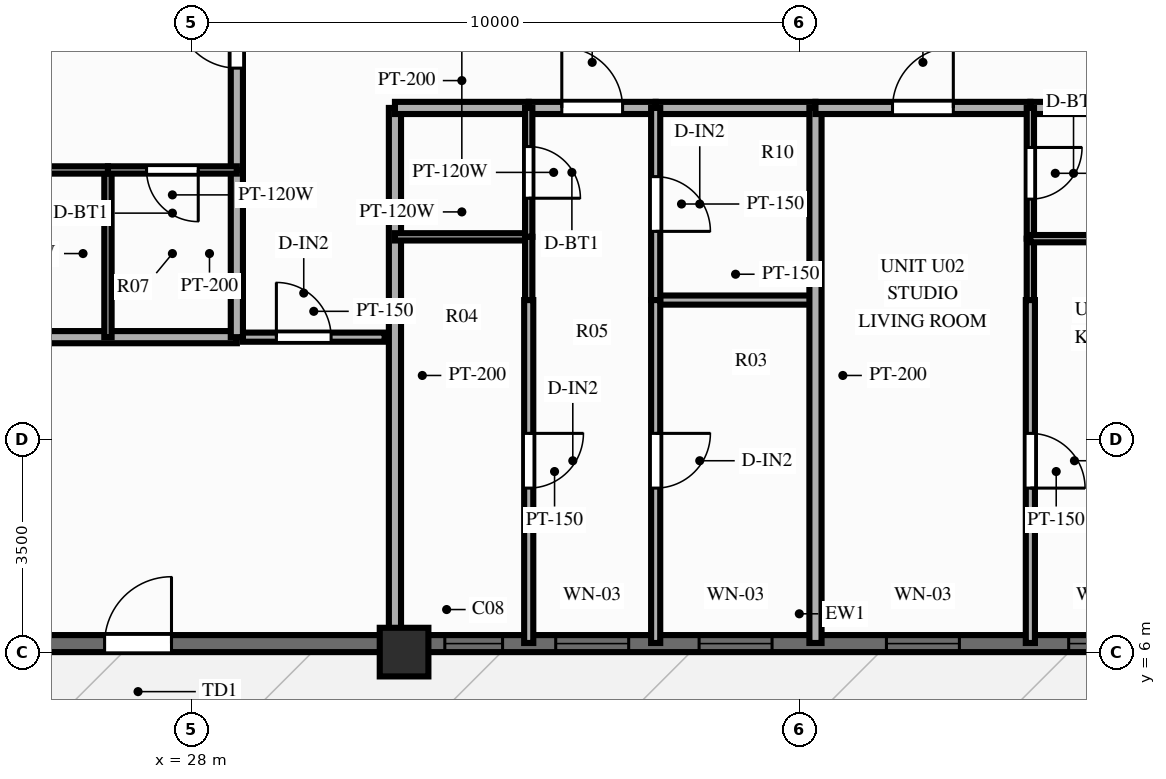
"""IFC4 building model, lengths in metres.
Left out: names, types, materials, properties, quantities, classifications, styles, units other than length and angle.
Written with IfcOpenShell. Run it as: python <this file> out.ifc"""

import sys

from ifc_helpers import new_model, si_unit, direction, frame, frame_2d, origin, origin_2d, place, context, subcontext, project, spatial, rectangle, extrude, source, transform, mapped, element, fill, save


model = new_model("IFC4")
c1 = context("Model", 3, precision=1e-05, world=origin(), true_north=direction((0.0, 1.0)))
c2 = subcontext(c1, "Body", "Model", "MODEL_VIEW")
j1 = project(units=[si_unit("LENGTHUNIT", "METRE"), si_unit("PLANEANGLEUNIT", "RADIAN")], contexts=[c1])
p1 = place(None, origin())
s1 = spatial("IfcSite", under=j1, at=p1, CompositionType="ELEMENT")
p2 = place(p1, origin())
s2 = spatial("IfcBuilding", under=s1, at=p2, CompositionType="ELEMENT")
p3 = place(p2, frame((0.0, 0.0, 176.8)))
s3 = spatial("IfcBuildingStorey", under=s2, at=p3, CompositionType="ELEMENT", Elevation=176.8)
m1 = source(origin(), c2, "Body", "SweptSolid", [
    extrude(rectangle(XDim=0.8, YDim=0.8, at=origin_2d()), origin(), (0.0, 0.0, 1.0), 3.0),
])
p4 = place(p3, frame((31.5, 6.0, 0.0), z_axis=(0.0, 0.0, 1.0), x_axis=(1.0, 0.0, 0.0)))
e1 = element("IfcColumn", 1, at=p4, inside=s3, PredefinedType="COLUMN", context=c2, shape_type="MappedRepresentation", body=[
    mapped(m1, transform((0.0, 0.0, 0.0), scale=1.0)),
])
p5 = place(p3, frame((22.75, 6.14, 0.0), z_axis=(0.0, 0.0, 1.0), x_axis=(1.0, 0.0, 0.0)))
e2 = element("IfcWall", 2, at=p5, inside=s3, PredefinedType="SOLIDWALL", context=c2, shape_type="SweptSolid", body=[
    extrude(rectangle(XDim=30.5, YDim=0.28, at=frame_2d((15.25, 0.0))), origin(), (0.0, 0.0, 1.0), 2.28),
])
p6 = place(p5, frame((4.925, 0.0, 0.0), z_axis=(0.0, 0.0, 1.0), x_axis=(-1.0, 0.0, 0.0)))
e3 = element("IfcOpeningElement", 3, at=p6, cuts=e2, PredefinedType="OPENING", context=c2, shape_type="SweptSolid", body=[
    extrude(rectangle(XDim=1.1, YDim=2.15, at=frame_2d((0.55, 1.075))), frame((0.0, 0.152, 0.0), z_axis=(0.0, -1.0, 0.0), x_axis=(1.0, 0.0, 0.0)), (0.0, 0.0, 1.0), 0.304),
])
p7 = place(p5, frame((9.42, 0.0, 0.25)))
e4 = element("IfcOpeningElement", 4, at=p7, cuts=e2, PredefinedType="OPENING", context=c2, shape_type="SweptSolid", body=[
    extrude(rectangle(XDim=0.95, YDim=1.5, at=frame_2d((0.475, 0.75))), frame((0.0, 0.152, 0.0), z_axis=(0.0, -1.0, 0.0), x_axis=(1.0, 0.0, 0.0)), (0.0, 0.0, 1.0), 0.304),
])
p8 = place(p5, frame((11.244, 0.0, 0.25)))
e5 = element("IfcOpeningElement", 5, at=p8, cuts=e2, PredefinedType="OPENING", context=c2, shape_type="SweptSolid", body=[
    extrude(rectangle(XDim=1.2, YDim=1.5, at=frame_2d((0.6, 0.75))), frame((0.0, 0.152, 0.0), z_axis=(0.0, -1.0, 0.0), x_axis=(1.0, 0.0, 0.0)), (0.0, 0.0, 1.0), 0.304),
])
p9 = place(p5, frame((13.602, 0.0, 0.25)))
e6 = element("IfcOpeningElement", 6, at=p9, cuts=e2, PredefinedType="OPENING", context=c2, shape_type="SweptSolid", body=[
    extrude(rectangle(XDim=1.2, YDim=1.5, at=frame_2d((0.6, 0.75))), frame((0.0, 0.152, 0.0), z_axis=(0.0, -1.0, 0.0), x_axis=(1.0, 0.0, 0.0)), (0.0, 0.0, 1.0), 0.304),
])
p10 = place(p5, frame((16.683, 0.0, 0.25)))
e7 = element("IfcOpeningElement", 7, at=p10, cuts=e2, PredefinedType="OPENING", context=c2, shape_type="SweptSolid", body=[
    extrude(rectangle(XDim=1.2, YDim=1.5, at=frame_2d((0.6, 0.75))), frame((0.0, 0.152, 0.0), z_axis=(0.0, -1.0, 0.0), x_axis=(1.0, 0.0, 0.0)), (0.0, 0.0, 1.0), 0.304),
])
p11 = place(p5, frame((19.68, 0.0, 0.25)))
e8 = element("IfcOpeningElement", 8, at=p11, cuts=e2, PredefinedType="OPENING", context=c2, shape_type="SweptSolid", body=[
    extrude(rectangle(XDim=1.2, YDim=1.5, at=frame_2d((0.6, 0.75))), frame((0.0, 0.152, 0.0), z_axis=(0.0, -1.0, 0.0), x_axis=(1.0, 0.0, 0.0)), (0.0, 0.0, 1.0), 0.304),
])
p12 = place(p5, frame((25.525, 0.0, 0.25)))
e9 = element("IfcOpeningElement", 9, at=p12, cuts=e2, PredefinedType="OPENING", context=c2, shape_type="SweptSolid", body=[
    extrude(rectangle(XDim=1.2, YDim=1.5, at=frame_2d((0.6, 0.75))), frame((0.0, 0.152, 0.0), z_axis=(0.0, -1.0, 0.0), x_axis=(1.0, 0.0, 0.0)), (0.0, 0.0, 1.0), 0.304),
])
p13 = place(p3, frame((28.85, 11.18, 0.0), z_axis=(0.0, 0.0, 1.0), x_axis=(1.0, 0.0, 0.0)))
e10 = element("IfcWall", 10, at=p13, inside=s3, PredefinedType="PARTITIONING", context=c2, shape_type="SweptSolid", body=[
    extrude(rectangle(XDim=2.33, YDim=0.15, at=frame_2d((1.165, 0.0))), origin(), (0.0, 0.0, 1.0), 2.79),
])
p14 = place(p13, frame((0.55, 0.0, 0.0)))
e11 = element("IfcOpeningElement", 11, at=p14, cuts=e10, PredefinedType="OPENING", context=c2, shape_type="SweptSolid", body=[
    extrude(rectangle(XDim=0.9, YDim=2.1, at=frame_2d((0.45, 1.05))), frame((0.0, 0.087, 0.0), z_axis=(0.0, -1.0, 0.0), x_axis=(1.0, 0.0, 0.0)), (0.0, 0.0, 1.0), 0.174),
])
p15 = place(p3, frame((31.35, 14.95, 0.0), z_axis=(0.0, 0.0, 1.0), x_axis=(0.0, -1.0, 0.0)))
e12 = element("IfcWall", 12, at=p15, inside=s3, PredefinedType="PARTITIONING", context=c2, shape_type="SweptSolid", body=[
    extrude(rectangle(XDim=8.8, YDim=0.2, at=frame_2d((4.4, 0.0))), origin(), (0.0, 0.0, 1.0), 2.39),
])
p16 = place(p3, frame((31.35, 14.95, 0.0), z_axis=(0.0, 0.0, 1.0), x_axis=(1.0, 0.0, 0.0)))
e13 = element("IfcWall", 13, at=p16, inside=s3, PredefinedType="PARTITIONING", context=c2, shape_type="SweptSolid", body=[
    extrude(rectangle(XDim=2.2, YDim=0.2, at=frame_2d((1.1, 0.0))), origin(), (0.0, 0.0, 1.0), 2.79),
])
p17 = place(p3, frame((33.55, 14.95, 0.0), z_axis=(0.0, 0.0, 1.0), x_axis=(1.0, 0.0, 0.0)))
e14 = element("IfcWall", 14, at=p17, inside=s3, PredefinedType="PARTITIONING", context=c2, shape_type="SweptSolid", body=[
    extrude(rectangle(XDim=2.088, YDim=0.2, at=frame_2d((1.044, 0.0))), origin(), (0.0, 0.0, 1.0), 2.79),
])
p18 = place(p17, frame((0.544, 0.0, 0.0)))
e15 = element("IfcOpeningElement", 15, at=p18, cuts=e14, PredefinedType="OPENING", context=c2, shape_type="SweptSolid", body=[
    extrude(rectangle(XDim=1.0, YDim=2.15, at=frame_2d((0.5, 1.075))), frame((0.0, 0.112, 0.0), z_axis=(0.0, -1.0, 0.0), x_axis=(1.0, 0.0, 0.0)), (0.0, 0.0, 1.0), 0.224),
])
p19 = place(p3, frame((35.638, 14.95, 0.0), z_axis=(0.0, 0.0, 1.0), x_axis=(1.0, 0.0, 0.0)))
e16 = element("IfcWall", 16, at=p19, inside=s3, PredefinedType="PARTITIONING", context=c2, shape_type="SweptSolid", body=[
    extrude(rectangle(XDim=2.628, YDim=0.2, at=frame_2d((1.314, 0.0))), origin(), (0.0, 0.0, 1.0), 2.79),
])
p20 = place(p3, frame((31.35, 12.83, 0.0), z_axis=(0.0, 0.0, 1.0), x_axis=(1.0, 0.0, 0.0)))
e17 = element("IfcWall", 17, at=p20, inside=s3, PredefinedType="PARTITIONING", context=c2, shape_type="SweptSolid", body=[
    extrude(rectangle(XDim=2.2, YDim=0.12, at=frame_2d((1.1, 0.0))), origin(), (0.0, 0.0, 1.0), 2.79),
])
p21 = place(p3, frame((35.638, 11.79, 0.0), z_axis=(0.0, 0.0, 1.0), x_axis=(1.0, 0.0, 0.0)))
e18 = element("IfcWall", 18, at=p21, inside=s3, PredefinedType="PARTITIONING", context=c2, shape_type="SweptSolid", body=[
    extrude(rectangle(XDim=2.628, YDim=0.15, at=frame_2d((1.314, 0.0))), origin(), (0.0, 0.0, 1.0), 2.49),
])
p22 = place(p3, frame((33.55, 14.95, 0.0), z_axis=(0.0, 0.0, 1.0), x_axis=(0.0, -1.0, 0.0)))
e19 = element("IfcWall", 19, at=p22, inside=s3, PredefinedType="PARTITIONING", context=c2, shape_type="SweptSolid", body=[
    extrude(rectangle(XDim=2.12, YDim=0.12, at=frame_2d((1.06, 0.0))), origin(), (0.0, 0.0, 1.0), 2.79),
])
p23 = place(p22, frame((0.635, 0.0, 0.0)))
e20 = element("IfcOpeningElement", 20, at=p23, cuts=e19, PredefinedType="OPENING", context=c2, shape_type="SweptSolid", body=[
    extrude(rectangle(XDim=0.85, YDim=2.05, at=frame_2d((0.425, 1.025))), frame((0.0, 0.072, 0.0), z_axis=(0.0, -1.0, 0.0), x_axis=(1.0, 0.0, 0.0)), (0.0, 0.0, 1.0), 0.144),
])
p24 = place(p3, frame((33.55, 12.83, 0.0), z_axis=(0.0, 0.0, 1.0), x_axis=(0.0, -1.0, 0.0)))
e21 = element("IfcWall", 21, at=p24, inside=s3, PredefinedType="PARTITIONING", context=c2, shape_type="SweptSolid", body=[
    extrude(rectangle(XDim=1.04, YDim=0.12, at=frame_2d((0.52, 0.0))), origin(), (0.0, 0.0, 1.0), 2.79),
])
p25 = place(p3, frame((33.55, 11.79, 0.0), z_axis=(0.0, 0.0, 1.0), x_axis=(0.0, -1.0, 0.0)))
e22 = element("IfcWall", 22, at=p25, inside=s3, PredefinedType="PARTITIONING", context=c2, shape_type="SweptSolid", body=[
    extrude(rectangle(XDim=5.64, YDim=0.15, at=frame_2d((2.82, 0.0))), origin(), (0.0, 0.0, 1.0), 2.79),
])
p26 = place(p25, frame((2.192, 0.0, 0.0)))
e23 = element("IfcOpeningElement", 23, at=p26, cuts=e22, PredefinedType="OPENING", context=c2, shape_type="SweptSolid", body=[
    extrude(rectangle(XDim=0.9, YDim=2.1, at=frame_2d((0.45, 1.05))), frame((0.0, 0.087, 0.0), z_axis=(0.0, -1.0, 0.0), x_axis=(1.0, 0.0, 0.0)), (0.0, 0.0, 1.0), 0.174),
])
p27 = place(p3, frame((35.638, 14.95, 0.0), z_axis=(0.0, 0.0, 1.0), x_axis=(0.0, -1.0, 0.0)))
e24 = element("IfcWall", 24, at=p27, inside=s3, PredefinedType="PARTITIONING", context=c2, shape_type="SweptSolid", body=[
    extrude(rectangle(XDim=3.16, YDim=0.15, at=frame_2d((1.58, 0.0))), origin(), (0.0, 0.0, 1.0), 2.79),
])
p28 = place(p27, frame((1.13, 0.0, 0.0)))
e25 = element("IfcOpeningElement", 25, at=p28, cuts=e24, PredefinedType="OPENING", context=c2, shape_type="SweptSolid", body=[
    extrude(rectangle(XDim=0.9, YDim=2.1, at=frame_2d((0.45, 1.05))), frame((0.0, 0.087, 0.0), z_axis=(0.0, -1.0, 0.0), x_axis=(1.0, 0.0, 0.0)), (0.0, 0.0, 1.0), 0.174),
])
p29 = place(p3, frame((35.638, 11.79, 0.0), z_axis=(0.0, 0.0, 1.0), x_axis=(0.0, -1.0, 0.0)))
e26 = element("IfcWall", 26, at=p29, inside=s3, PredefinedType="PARTITIONING", context=c2, shape_type="SweptSolid", body=[
    extrude(rectangle(XDim=5.64, YDim=0.15, at=frame_2d((2.82, 0.0))), origin(), (0.0, 0.0, 1.0), 2.79),
])
p30 = place(p29, frame((2.192, 0.0, 0.0)))
e27 = element("IfcOpeningElement", 27, at=p30, cuts=e26, PredefinedType="OPENING", context=c2, shape_type="SweptSolid", body=[
    extrude(rectangle(XDim=0.9, YDim=2.1, at=frame_2d((0.45, 1.05))), frame((0.0, 0.087, 0.0), z_axis=(0.0, -1.0, 0.0), x_axis=(1.0, 0.0, 0.0)), (0.0, 0.0, 1.0), 0.174),
])
p31 = place(p3, frame((38.266, 14.95, 0.0), z_axis=(0.0, 0.0, 1.0), x_axis=(0.0, -1.0, 0.0)))
e28 = element("IfcWall", 28, at=p31, inside=s3, PredefinedType="PARTITIONING", context=c2, shape_type="SweptSolid", body=[
    extrude(rectangle(XDim=8.8, YDim=0.2, at=frame_2d((4.4, 0.0))), origin(), (0.0, 0.0, 1.0), 2.79),
])
p32 = place(p3, frame((38.266, 14.95, 0.0), z_axis=(0.0, 0.0, 1.0), x_axis=(1.0, 0.0, 0.0)))
e29 = element("IfcWall", 29, at=p32, inside=s3, PredefinedType="PARTITIONING", context=c2, shape_type="SweptSolid", body=[
    extrude(rectangle(XDim=3.534, YDim=0.2, at=frame_2d((1.767, 0.0))), origin(), (0.0, 0.0, 1.0), 2.79),
])
p33 = place(p32, frame((1.267, 0.0, 0.0)))
e30 = element("IfcOpeningElement", 30, at=p33, cuts=e29, PredefinedType="OPENING", context=c2, shape_type="SweptSolid", body=[
    extrude(rectangle(XDim=1.0, YDim=2.15, at=frame_2d((0.5, 1.075))), frame((0.0, 0.112, 0.0), z_axis=(0.0, -1.0, 0.0), x_axis=(1.0, 0.0, 0.0)), (0.0, 0.0, 1.0), 0.224),
])
p34 = place(p3, frame((41.8, 14.95, 0.0), z_axis=(0.0, 0.0, 1.0), x_axis=(1.0, 0.0, 0.0)))
e31 = element("IfcWall", 31, at=p34, inside=s3, PredefinedType="PARTITIONING", context=c2, shape_type="SweptSolid", body=[
    extrude(rectangle(XDim=2.85, YDim=0.2, at=frame_2d((1.425, 0.0))), origin(), (0.0, 0.0, 1.0), 2.79),
])
p35 = place(p3, frame((41.8, 14.95, 0.0), z_axis=(0.0, 0.0, 1.0), x_axis=(0.0, -1.0, 0.0)))
e32 = element("IfcWall", 32, at=p35, inside=s3, PredefinedType="PARTITIONING", context=c2, shape_type="SweptSolid", body=[
    extrude(rectangle(XDim=2.15, YDim=0.12, at=frame_2d((1.075, 0.0))), origin(), (0.0, 0.0, 1.0), 2.79),
])
p36 = place(p35, frame((0.65, 0.0, 0.0)))
e33 = element("IfcOpeningElement", 33, at=p36, cuts=e32, PredefinedType="OPENING", context=c2, shape_type="SweptSolid", body=[
    extrude(rectangle(XDim=0.85, YDim=2.05, at=frame_2d((0.425, 1.025))), frame((0.0, 0.072, 0.0), z_axis=(0.0, -1.0, 0.0), x_axis=(1.0, 0.0, 0.0)), (0.0, 0.0, 1.0), 0.144),
])
p37 = place(p3, frame((41.8, 12.8, 0.0), z_axis=(0.0, 0.0, 1.0), x_axis=(0.0, -1.0, 0.0)))
e34 = element("IfcWall", 34, at=p37, inside=s3, PredefinedType="PARTITIONING", context=c2, shape_type="SweptSolid", body=[
    extrude(rectangle(XDim=1.01, YDim=0.12, at=frame_2d((0.505, 0.0))), origin(), (0.0, 0.0, 1.0), 2.79),
])
p38 = place(p3, frame((41.8, 12.8, 0.0), z_axis=(0.0, 0.0, 1.0), x_axis=(1.0, 0.0, 0.0)))
e35 = element("IfcWall", 35, at=p38, inside=s3, PredefinedType="PARTITIONING", context=c2, shape_type="SweptSolid", body=[
    extrude(rectangle(XDim=2.85, YDim=0.12, at=frame_2d((1.425, 0.0))), origin(), (0.0, 0.0, 1.0), 2.79),
])
p39 = place(p3, frame((41.8, 11.79, 0.0), z_axis=(0.0, 0.0, 1.0), x_axis=(0.0, -1.0, 0.0)))
e36 = element("IfcWall", 36, at=p39, inside=s3, PredefinedType="PARTITIONING", context=c2, shape_type="SweptSolid", body=[
    extrude(rectangle(XDim=5.64, YDim=0.15, at=frame_2d((2.82, 0.0))), origin(), (0.0, 0.0, 1.0), 2.79),
])
p40 = place(p39, frame((2.192, 0.0, 0.0)))
e37 = element("IfcOpeningElement", 37, at=p40, cuts=e36, PredefinedType="OPENING", context=c2, shape_type="SweptSolid", body=[
    extrude(rectangle(XDim=0.9, YDim=2.1, at=frame_2d((0.45, 1.05))), frame((0.0, 0.087, 0.0), z_axis=(0.0, -1.0, 0.0), x_axis=(1.0, 0.0, 0.0)), (0.0, 0.0, 1.0), 0.174),
])
p41 = place(p3, frame((28.75, 11.18, 0.0), z_axis=(0.0, 0.0, 1.0), x_axis=(-1.0, 0.0, 0.0)))
e38 = element("IfcWall", 38, at=p41, inside=s3, PredefinedType="PARTITIONING", context=c2, shape_type="SweptSolid", body=[
    extrude(rectangle(XDim=10.85, YDim=0.2, at=frame_2d((5.425, 0.0))), origin(), (0.0, 0.0, 1.0), 2.79),
])
p42 = place(p3, frame((28.75, 11.18, 0.0), z_axis=(0.0, 0.0, 1.0), x_axis=(0.0, 1.0, 0.0)))
e39 = element("IfcWall", 39, at=p42, inside=s3, PredefinedType="PARTITIONING", context=c2, shape_type="SweptSolid", body=[
    extrude(rectangle(XDim=2.75, YDim=0.2, at=frame_2d((1.375, 0.0))), origin(), (0.0, 0.0, 1.0), 2.79),
])
p43 = place(p3, frame((28.75, 13.93, 0.0), z_axis=(0.0, 0.0, 1.0), x_axis=(0.0, 1.0, 0.0)))
e40 = element("IfcWall", 40, at=p43, inside=s3, PredefinedType="PARTITIONING", context=c2, shape_type="SweptSolid", body=[
    extrude(rectangle(XDim=4.35, YDim=0.2, at=frame_2d((2.175, 0.0))), origin(), (0.0, 0.0, 1.0), 2.79),
])
p44 = place(p43, frame((1.675, 0.0, 0.0)))
e41 = element("IfcOpeningElement", 41, at=p44, cuts=e40, PredefinedType="OPENING", context=c2, shape_type="SweptSolid", body=[
    extrude(rectangle(XDim=1.0, YDim=2.15, at=frame_2d((0.5, 1.075))), frame((0.0, 0.112, 0.0), z_axis=(0.0, -1.0, 0.0), x_axis=(1.0, 0.0, 0.0)), (0.0, 0.0, 1.0), 0.224),
])
p45 = place(p3, frame((26.63, 11.18, 0.0), z_axis=(0.0, 0.0, 1.0), x_axis=(0.0, 1.0, 0.0)))
e42 = element("IfcWall", 42, at=p45, inside=s3, PredefinedType="PARTITIONING", context=c2, shape_type="SweptSolid", body=[
    extrude(rectangle(XDim=2.75, YDim=0.12, at=frame_2d((1.375, 0.0))), origin(), (0.0, 0.0, 1.0), 2.79),
])
p46 = place(p3, frame((28.75, 13.93, 0.0), z_axis=(0.0, 0.0, 1.0), x_axis=(-1.0, 0.0, 0.0)))
e43 = element("IfcWall", 43, at=p46, inside=s3, PredefinedType="PARTITIONING", context=c2, shape_type="SweptSolid", body=[
    extrude(rectangle(XDim=2.12, YDim=0.12, at=frame_2d((1.06, 0.0))), origin(), (0.0, 0.0, 1.0), 2.79),
])
p47 = place(p46, frame((0.635, 0.0, 0.0)))
e44 = element("IfcOpeningElement", 44, at=p47, cuts=e43, PredefinedType="OPENING", context=c2, shape_type="SweptSolid", body=[
    extrude(rectangle(XDim=0.85, YDim=2.05, at=frame_2d((0.425, 1.025))), frame((0.0, 0.072, 0.0), z_axis=(0.0, -1.0, 0.0), x_axis=(1.0, 0.0, 0.0)), (0.0, 0.0, 1.0), 0.144),
])
p48 = place(p3, frame((26.63, 13.93, 0.0), z_axis=(0.0, 0.0, 1.0), x_axis=(-1.0, 0.0, 0.0)))
e45 = element("IfcWall", 45, at=p48, inside=s3, PredefinedType="PARTITIONING", context=c2, shape_type="SweptSolid", body=[
    extrude(rectangle(XDim=1.04, YDim=0.12, at=frame_2d((0.52, 0.0))), origin(), (0.0, 0.0, 1.0), 2.79),
])
m2 = source(origin(), c2, "Body", "SweptSolid", [
    extrude(rectangle(XDim=1.1, YDim=2.15, at=frame_2d((0.55, 1.075))), frame((0.0, 0.025, 0.0), z_axis=(0.0, -1.0, 0.0), x_axis=(1.0, 0.0, 0.0)), (0.0, 0.0, 1.0), 0.05),
])
p49 = place(p6, origin())
e46 = element("IfcDoor", 46, at=p49, inside=s3, OperationType="SINGLE_SWING_LEFT", PredefinedType="DOOR", context=c2, shape_type="MappedRepresentation", body=[
    mapped(m2, transform((0.0, 0.0, 0.0), scale=1.0)),
])
fill(e3, e46)
m3 = source(origin(), c2, "Body", "SweptSolid", [
    extrude(rectangle(XDim=0.95, YDim=1.5, at=frame_2d((0.475, 0.75))), frame((0.0, 0.03, 0.0), z_axis=(0.0, -1.0, 0.0), x_axis=(1.0, 0.0, 0.0)), (0.0, 0.0, 1.0), 0.06),
])
p50 = place(p7, origin())
e47 = element("IfcWindow", 47, at=p50, inside=s3, PartitioningType="SINGLE_PANEL", PredefinedType="WINDOW", context=c2, shape_type="MappedRepresentation", body=[
    mapped(m3, transform((0.0, 0.0, 0.0), scale=1.0)),
])
fill(e4, e47)
m4 = source(origin(), c2, "Body", "SweptSolid", [
    extrude(rectangle(XDim=1.2, YDim=1.5, at=frame_2d((0.6, 0.75))), frame((0.0, 0.03, 0.0), z_axis=(0.0, -1.0, 0.0), x_axis=(1.0, 0.0, 0.0)), (0.0, 0.0, 1.0), 0.06),
])
p51 = place(p8, origin())
e48 = element("IfcWindow", 48, at=p51, inside=s3, PartitioningType="SINGLE_PANEL", PredefinedType="WINDOW", context=c2, shape_type="MappedRepresentation", body=[
    mapped(m4, transform((0.0, 0.0, 0.0), scale=1.0)),
])
fill(e5, e48)
p52 = place(p9, origin())
e49 = element("IfcWindow", 49, at=p52, inside=s3, PartitioningType="SINGLE_PANEL", PredefinedType="WINDOW", context=c2, shape_type="MappedRepresentation", body=[
    mapped(m4, transform((0.0, 0.0, 0.0), scale=1.0)),
])
fill(e6, e49)
p53 = place(p10, origin())
e50 = element("IfcWindow", 50, at=p53, inside=s3, PartitioningType="SINGLE_PANEL", PredefinedType="WINDOW", context=c2, shape_type="MappedRepresentation", body=[
    mapped(m4, transform((0.0, 0.0, 0.0), scale=1.0)),
])
fill(e7, e50)
p54 = place(p11, origin())
e51 = element("IfcWindow", 51, at=p54, inside=s3, PartitioningType="SINGLE_PANEL", PredefinedType="WINDOW", context=c2, shape_type="MappedRepresentation", body=[
    mapped(m4, transform((0.0, 0.0, 0.0), scale=1.0)),
])
fill(e8, e51)
m5 = source(origin(), c2, "Body", "SweptSolid", [
    extrude(rectangle(XDim=0.9, YDim=2.1, at=frame_2d((0.45, 1.05))), frame((0.0, 0.025, 0.0), z_axis=(0.0, -1.0, 0.0), x_axis=(1.0, 0.0, 0.0)), (0.0, 0.0, 1.0), 0.05),
])
p55 = place(p14, origin())
e52 = element("IfcDoor", 52, at=p55, inside=s3, OperationType="SINGLE_SWING_LEFT", PredefinedType="DOOR", context=c2, shape_type="MappedRepresentation", body=[
    mapped(m5, transform((0.0, 0.0, 0.0), scale=1.0)),
])
fill(e11, e52)
m6 = source(origin(), c2, "Body", "SweptSolid", [
    extrude(rectangle(XDim=1.0, YDim=2.15, at=frame_2d((0.5, 1.075))), frame((0.0, 0.025, 0.0), z_axis=(0.0, -1.0, 0.0), x_axis=(1.0, 0.0, 0.0)), (0.0, 0.0, 1.0), 0.05),
])
p56 = place(p18, origin())
e53 = element("IfcDoor", 53, at=p56, inside=s3, OperationType="SINGLE_SWING_LEFT", PredefinedType="DOOR", context=c2, shape_type="MappedRepresentation", body=[
    mapped(m6, transform((0.0, 0.0, 0.0), scale=1.0)),
])
fill(e15, e53)
m7 = source(origin(), c2, "Body", "SweptSolid", [
    extrude(rectangle(XDim=0.85, YDim=2.05, at=frame_2d((0.425, 1.025))), frame((0.0, 0.025, 0.0), z_axis=(0.0, -1.0, 0.0), x_axis=(1.0, 0.0, 0.0)), (0.0, 0.0, 1.0), 0.05),
])
p57 = place(p23, origin())
e54 = element("IfcDoor", 54, at=p57, inside=s3, OperationType="SINGLE_SWING_RIGHT", PredefinedType="DOOR", context=c2, shape_type="MappedRepresentation", body=[
    mapped(m7, transform((0.0, 0.0, 0.0), scale=1.0)),
])
fill(e20, e54)
p58 = place(p26, origin())
e55 = element("IfcDoor", 55, at=p58, inside=s3, OperationType="SINGLE_SWING_LEFT", PredefinedType="DOOR", context=c2, shape_type="MappedRepresentation", body=[
    mapped(m5, transform((0.0, 0.0, 0.0), scale=1.0)),
])
fill(e23, e55)
p59 = place(p28, origin())
e56 = element("IfcDoor", 56, at=p59, inside=s3, OperationType="SINGLE_SWING_RIGHT", PredefinedType="DOOR", context=c2, shape_type="MappedRepresentation", body=[
    mapped(m5, transform((0.0, 0.0, 0.0), scale=1.0)),
])
fill(e25, e56)
p60 = place(p30, origin())
e57 = element("IfcDoor", 57, at=p60, inside=s3, OperationType="SINGLE_SWING_LEFT", PredefinedType="DOOR", context=c2, shape_type="MappedRepresentation", body=[
    mapped(m5, transform((0.0, 0.0, 0.0), scale=1.0)),
])
fill(e27, e57)
p61 = place(p33, origin())
e58 = element("IfcDoor", 58, at=p61, inside=s3, OperationType="SINGLE_SWING_RIGHT", PredefinedType="DOOR", context=c2, shape_type="MappedRepresentation", body=[
    mapped(m6, transform((0.0, 0.0, 0.0), scale=1.0)),
])
fill(e30, e58)
p62 = place(p36, origin())
e59 = element("IfcDoor", 59, at=p62, inside=s3, OperationType="SINGLE_SWING_LEFT", PredefinedType="DOOR", context=c2, shape_type="MappedRepresentation", body=[
    mapped(m7, transform((0.0, 0.0, 0.0), scale=1.0)),
])
fill(e33, e59)
p63 = place(p40, origin())
e60 = element("IfcDoor", 60, at=p63, inside=s3, OperationType="SINGLE_SWING_RIGHT", PredefinedType="DOOR", context=c2, shape_type="MappedRepresentation", body=[
    mapped(m5, transform((0.0, 0.0, 0.0), scale=1.0)),
])
fill(e37, e60)
p64 = place(p44, origin())
e61 = element("IfcDoor", 61, at=p64, inside=s3, OperationType="SINGLE_SWING_RIGHT", PredefinedType="DOOR", context=c2, shape_type="MappedRepresentation", body=[
    mapped(m6, transform((0.0, 0.0, 0.0), scale=1.0)),
])
fill(e41, e61)
p65 = place(p47, origin())
e62 = element("IfcDoor", 62, at=p65, inside=s3, OperationType="SINGLE_SWING_LEFT", PredefinedType="DOOR", context=c2, shape_type="MappedRepresentation", body=[
    mapped(m7, transform((0.0, 0.0, 0.0), scale=1.0)),
])
fill(e44, e62)
save(model, sys.argv[1])
